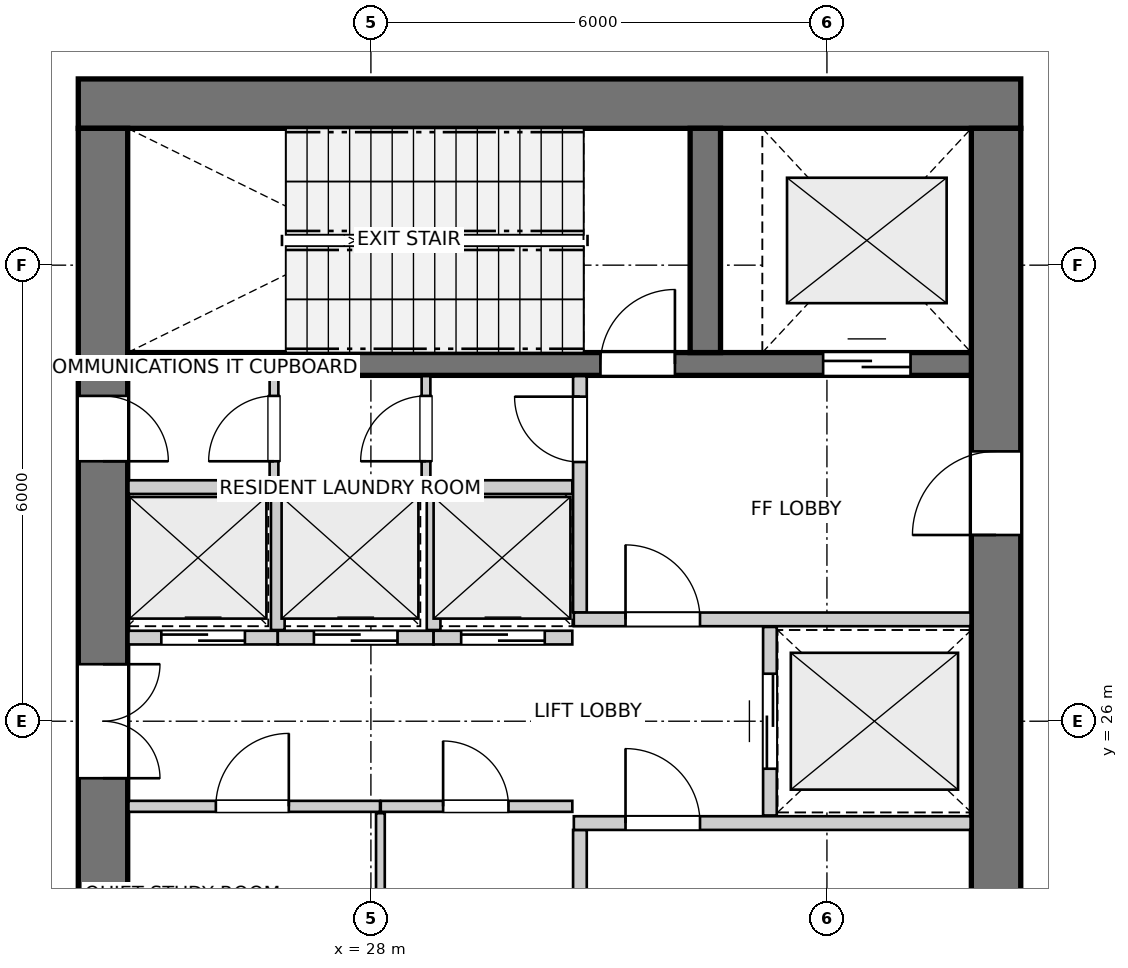
"""IFC4 building model, lengths in metres.
Left out: names, types, materials, properties, quantities, classifications, styles, units other than length and angle.
Written with IfcOpenShell. Run it as: python <this file> out.ifc"""

import sys

from ifc_helpers import new_model, si_unit, direction, frame, frame_2d, origin, place, context, subcontext, project, spatial, rectangle, extrude, source, transform, mapped, element, fill, save


model = new_model("IFC4")
c1 = context("Model", 3, precision=1e-05, world=origin(), true_north=direction((0.0, 1.0)))
c2 = subcontext(c1, "Body", "Model", "MODEL_VIEW")
j1 = project(units=[si_unit("LENGTHUNIT", "METRE"), si_unit("PLANEANGLEUNIT", "RADIAN")], contexts=[c1])
p1 = place(None, origin())
s1 = spatial("IfcSite", under=j1, at=p1, CompositionType="ELEMENT")
p2 = place(p1, origin())
s2 = spatial("IfcBuilding", under=s1, at=p2, CompositionType="ELEMENT")
p3 = place(p2, frame((0.0, 0.0, 190.6)))
s3 = spatial("IfcBuildingStorey", under=s2, at=p3, CompositionType="ELEMENT", Elevation=190.6)
p4 = place(p3, frame((36.55, 34.125, 0.0), z_axis=(0.0, 0.0, 1.0), x_axis=(-1.0, 0.0, 0.0)))
e1 = element("IfcWall", 1, at=p4, inside=s3, PredefinedType="SHEAR", context=c2, shape_type="SweptSolid", body=[
    extrude(rectangle(XDim=12.4, YDim=0.65, at=frame_2d((6.2, 0.0))), origin(), (0.0, 0.0, 1.0), 4.76),
])
p5 = place(p3, frame((24.475, 33.8, 0.0), z_axis=(0.0, 0.0, 1.0), x_axis=(0.0, -1.0, 0.0)))
e2 = element("IfcWall", 2, at=p5, inside=s3, PredefinedType="SHEAR", context=c2, shape_type="SweptSolid", body=[
    extrude(rectangle(XDim=15.6, YDim=0.65, at=frame_2d((7.8, 0.0))), origin(), (0.0, 0.0, 1.0), 4.76),
])
p6 = place(p5, frame((7.05, 0.0, 0.0)))
e3 = element("IfcOpeningElement", 3, at=p6, cuts=e2, PredefinedType="OPENING", context=c2, shape_type="SweptSolid", body=[
    extrude(rectangle(XDim=1.5, YDim=2.15, at=frame_2d((0.75, 1.075))), frame((0.0, 0.335, 0.0), z_axis=(0.0, -1.0, 0.0), x_axis=(1.0, 0.0, 0.0)), (0.0, 0.0, 1.0), 0.67),
])
p7 = place(p5, frame((3.52, 0.0, 0.0)))
e4 = element("IfcOpeningElement", 4, at=p7, cuts=e2, PredefinedType="OPENING", context=c2, shape_type="SweptSolid", body=[
    extrude(rectangle(XDim=0.86, YDim=2.05, at=frame_2d((0.43, 1.025))), frame((0.0, 0.335, 0.0), z_axis=(0.0, -1.0, 0.0), x_axis=(1.0, 0.0, 0.0)), (0.0, 0.0, 1.0), 0.67),
])
p8 = place(p5, frame((11.22, 0.0, 0.0)))
e5 = element("IfcOpeningElement", 5, at=p8, cuts=e2, PredefinedType="OPENING", context=c2, shape_type="SweptSolid", body=[
    extrude(rectangle(XDim=0.86, YDim=2.05, at=frame_2d((0.43, 1.025))), frame((0.0, 0.335, 0.0), z_axis=(0.0, -1.0, 0.0), x_axis=(1.0, 0.0, 0.0)), (0.0, 0.0, 1.0), 0.67),
])
p9 = place(p3, frame((36.225, 18.2, 0.0), z_axis=(0.0, 0.0, 1.0), x_axis=(0.0, 1.0, 0.0)))
e6 = element("IfcWall", 6, at=p9, inside=s3, PredefinedType="SHEAR", context=c2, shape_type="SweptSolid", body=[
    extrude(rectangle(XDim=15.6, YDim=0.65, at=frame_2d((7.8, 0.0))), origin(), (0.0, 0.0, 1.0), 4.76),
])
p10 = place(p9, frame((4.25, 0.0, 0.0)))
e7 = element("IfcOpeningElement", 7, at=p10, cuts=e6, PredefinedType="OPENING", context=c2, shape_type="SweptSolid", body=[
    extrude(rectangle(XDim=1.1, YDim=2.15, at=frame_2d((0.55, 1.075))), frame((0.0, 0.335, 0.0), z_axis=(0.0, -1.0, 0.0), x_axis=(1.0, 0.0, 0.0)), (0.0, 0.0, 1.0), 0.67),
])
p11 = place(p9, frame((10.25, 0.0, 0.0)))
e8 = element("IfcOpeningElement", 8, at=p11, cuts=e6, PredefinedType="OPENING", context=c2, shape_type="SweptSolid", body=[
    extrude(rectangle(XDim=1.1, YDim=2.15, at=frame_2d((0.55, 1.075))), frame((0.0, 0.335, 0.0), z_axis=(0.0, -1.0, 0.0), x_axis=(1.0, 0.0, 0.0)), (0.0, 0.0, 1.0), 0.67),
])
p12 = place(p3, frame((24.8, 30.7, 0.0), z_axis=(0.0, 0.0, 1.0), x_axis=(1.0, 0.0, 0.0)))
e9 = element("IfcWall", 9, at=p12, inside=s3, PredefinedType="SHEAR", context=c2, shape_type="SweptSolid", body=[
    extrude(rectangle(XDim=11.1, YDim=0.3, at=frame_2d((5.55, 0.0))), origin(), (0.0, 0.0, 1.0), 4.76),
])
p13 = place(p12, frame((6.22, 0.0, 0.0)))
e10 = element("IfcOpeningElement", 10, at=p13, cuts=e9, PredefinedType="OPENING", context=c2, shape_type="SweptSolid", body=[
    extrude(rectangle(XDim=0.98, YDim=2.15, at=frame_2d((0.49, 1.075))), frame((0.0, 0.16, 0.0), z_axis=(0.0, -1.0, 0.0), x_axis=(1.0, 0.0, 0.0)), (0.0, 0.0, 1.0), 0.32),
])
p14 = place(p12, frame((9.15, 0.0, 0.0)))
e11 = element("IfcOpeningElement", 11, at=p14, cuts=e9, PredefinedType="OPENING", context=c2, shape_type="SweptSolid", body=[
    extrude(rectangle(XDim=1.15, YDim=2.15, at=frame_2d((0.575, 1.075))), frame((0.0, 0.16, 0.0), z_axis=(0.0, -1.0, 0.0), x_axis=(1.0, 0.0, 0.0)), (0.0, 0.0, 1.0), 0.32),
])
p15 = place(p3, frame((32.4, 30.85, 0.0), z_axis=(0.0, 0.0, 1.0), x_axis=(0.0, 1.0, 0.0)))
e12 = element("IfcWall", 12, at=p15, inside=s3, PredefinedType="SHEAR", context=c2, shape_type="SweptSolid", body=[
    extrude(rectangle(XDim=2.95, YDim=0.4, at=frame_2d((1.475, 0.0))), origin(), (0.0, 0.0, 1.0), 4.76),
])
p16 = place(p3, frame((30.75, 21.46, 0.0), z_axis=(0.0, 0.0, 1.0), x_axis=(0.0, 1.0, 0.0)))
e13 = element("IfcWall", 13, at=p16, inside=s3, PredefinedType="PARTITIONING", context=c2, shape_type="SweptSolid", body=[
    extrude(rectangle(XDim=3.11, YDim=0.18, at=frame_2d((1.555, 0.0))), origin(), (0.0, 0.0, 1.0), 4.76),
])
p17 = place(p16, frame((0.26, 0.0, 0.0)))
e14 = element("IfcOpeningElement", 14, at=p17, cuts=e13, PredefinedType="OPENING", context=c2, shape_type="SweptSolid", body=[
    extrude(rectangle(XDim=0.86, YDim=2.05, at=frame_2d((0.43, 1.025))), frame((0.0, 0.1, 0.0), z_axis=(0.0, -1.0, 0.0), x_axis=(1.0, 0.0, 0.0)), (0.0, 0.0, 1.0), 0.2),
])
p18 = place(p3, frame((30.67, 24.66, 0.0), z_axis=(0.0, 0.0, 1.0), x_axis=(1.0, 0.0, 0.0)))
e15 = element("IfcWall", 15, at=p18, inside=s3, PredefinedType="PARTITIONING", context=c2, shape_type="SweptSolid", body=[
    extrude(rectangle(XDim=5.22, YDim=0.18, at=frame_2d((2.61, 0.0))), origin(), (0.0, 0.0, 1.0), 4.76),
])
p19 = place(p18, frame((0.68, 0.0, 0.0)))
e16 = element("IfcOpeningElement", 16, at=p19, cuts=e15, PredefinedType="OPENING", context=c2, shape_type="SweptSolid", body=[
    extrude(rectangle(XDim=0.98, YDim=2.15, at=frame_2d((0.49, 1.075))), frame((0.0, 0.1, 0.0), z_axis=(0.0, -1.0, 0.0), x_axis=(1.0, 0.0, 0.0)), (0.0, 0.0, 1.0), 0.2),
])
p20 = place(p3, frame((30.75, 27.43, 0.0), z_axis=(0.0, 0.0, 1.0), x_axis=(0.0, 1.0, 0.0)))
e17 = element("IfcWall", 17, at=p20, inside=s3, PredefinedType="PARTITIONING", context=c2, shape_type="SweptSolid", body=[
    extrude(rectangle(XDim=3.11, YDim=0.18, at=frame_2d((1.555, 0.0))), origin(), (0.0, 0.0, 1.0), 4.76),
])
p21 = place(p20, frame((1.98, 0.0, 0.0)))
e18 = element("IfcOpeningElement", 18, at=p21, cuts=e17, PredefinedType="OPENING", context=c2, shape_type="SweptSolid", body=[
    extrude(rectangle(XDim=0.86, YDim=2.05, at=frame_2d((0.43, 1.025))), frame((0.0, 0.1, 0.0), z_axis=(0.0, -1.0, 0.0), x_axis=(1.0, 0.0, 0.0)), (0.0, 0.0, 1.0), 0.2),
])
p22 = place(p3, frame((30.67, 27.34, 0.0), z_axis=(0.0, 0.0, 1.0), x_axis=(1.0, 0.0, 0.0)))
e19 = element("IfcWall", 19, at=p22, inside=s3, PredefinedType="PARTITIONING", context=c2, shape_type="SweptSolid", body=[
    extrude(rectangle(XDim=5.22, YDim=0.18, at=frame_2d((2.61, 0.0))), origin(), (0.0, 0.0, 1.0), 4.76),
])
p23 = place(p22, frame((0.68, 0.0, 0.0)))
e20 = element("IfcOpeningElement", 20, at=p23, cuts=e19, PredefinedType="OPENING", context=c2, shape_type="SweptSolid", body=[
    extrude(rectangle(XDim=0.98, YDim=2.15, at=frame_2d((0.49, 1.075))), frame((0.0, 0.1, 0.0), z_axis=(0.0, -1.0, 0.0), x_axis=(1.0, 0.0, 0.0)), (0.0, 0.0, 1.0), 0.2),
])
p24 = place(p3, frame((33.25, 24.76, 0.0), z_axis=(0.0, 0.0, 1.0), x_axis=(0.0, 1.0, 0.0)))
e21 = element("IfcWall", 21, at=p24, inside=s3, PredefinedType="PARTITIONING", context=c2, shape_type="SweptSolid", body=[
    extrude(rectangle(XDim=2.48, YDim=0.18, at=frame_2d((1.24, 0.0))), origin(), (0.0, 0.0, 1.0), 4.76),
])
p25 = place(p24, frame((0.615, 0.0, 0.0)))
e22 = element("IfcOpeningElement", 22, at=p25, cuts=e21, PredefinedType="OPENING", context=c2, shape_type="SweptSolid", body=[
    extrude(rectangle(XDim=1.25, YDim=2.15, at=frame_2d((0.625, 1.075))), frame((0.0, 0.1, 0.0), z_axis=(0.0, -1.0, 0.0), x_axis=(1.0, 0.0, 0.0)), (0.0, 0.0, 1.0), 0.2),
])
p26 = place(p3, frame((24.81, 24.88, 0.0), z_axis=(0.0, 0.0, 1.0), x_axis=(1.0, 0.0, 0.0)))
e23 = element("IfcWall", 23, at=p26, inside=s3, PredefinedType="PARTITIONING", context=c2, shape_type="SweptSolid", body=[
    extrude(rectangle(XDim=3.31, YDim=0.145, at=frame_2d((1.655, 0.0))), origin(), (0.0, 0.0, 1.0), 4.76),
])
p27 = place(p26, frame((1.15, 0.0, 0.0)))
e24 = element("IfcOpeningElement", 24, at=p27, cuts=e23, PredefinedType="OPENING", context=c2, shape_type="SweptSolid", body=[
    extrude(rectangle(XDim=0.96, YDim=2.1, at=frame_2d((0.48, 1.05))), frame((0.0, 0.083, 0.0), z_axis=(0.0, -1.0, 0.0), x_axis=(1.0, 0.0, 0.0)), (0.0, 0.0, 1.0), 0.165),
])
p28 = place(p3, frame((28.13, 24.88, 0.0), z_axis=(0.0, 0.0, 1.0), x_axis=(1.0, 0.0, 0.0)))
e25 = element("IfcWall", 25, at=p28, inside=s3, PredefinedType="PARTITIONING", context=c2, shape_type="SweptSolid", body=[
    extrude(rectangle(XDim=2.52, YDim=0.145, at=frame_2d((1.26, 0.0))), origin(), (0.0, 0.0, 1.0), 4.76),
])
p29 = place(p28, frame((0.82, 0.0, 0.0)))
e26 = element("IfcOpeningElement", 26, at=p29, cuts=e25, PredefinedType="OPENING", context=c2, shape_type="SweptSolid", body=[
    extrude(rectangle(XDim=0.86, YDim=2.05, at=frame_2d((0.43, 1.025))), frame((0.0, 0.083, 0.0), z_axis=(0.0, -1.0, 0.0), x_axis=(1.0, 0.0, 0.0)), (0.0, 0.0, 1.0), 0.165),
])
p30 = place(p3, frame((28.125, 23.02, 0.0), z_axis=(0.0, 0.0, 1.0), x_axis=(0.0, 1.0, 0.0)))
e27 = element("IfcWall", 27, at=p30, inside=s3, PredefinedType="PARTITIONING", context=c2, shape_type="SweptSolid", body=[
    extrude(rectangle(XDim=1.77, YDim=0.115, at=frame_2d((0.885, 0.0))), origin(), (0.0, 0.0, 1.0), 4.76),
])
p31 = place(p3, frame((24.81, 29.08, 0.0), z_axis=(0.0, 0.0, 1.0), x_axis=(1.0, 0.0, 0.0)))
e28 = element("IfcWall", 28, at=p31, inside=s3, PredefinedType="PARTITIONING", context=c2, shape_type="SweptSolid", body=[
    extrude(rectangle(XDim=5.84, YDim=0.18, at=frame_2d((2.92, 0.0))), origin(), (0.0, 0.0, 1.0), 4.76),
])
p32 = place(p3, frame((24.81, 27.1, 0.0), z_axis=(0.0, 0.0, 1.0), x_axis=(1.0, 0.0, 0.0)))
e29 = element("IfcWall", 29, at=p32, inside=s3, PredefinedType="PARTITIONING", context=c2, shape_type="SweptSolid", body=[
    extrude(rectangle(XDim=1.965, YDim=0.18, at=frame_2d((0.982, 0.0))), origin(), (0.0, 0.0, 1.0), 4.76),
])
p33 = place(p32, frame((0.433, 0.0, 0.0)))
e30 = element("IfcOpeningElement", 30, at=p33, cuts=e29, PredefinedType="OPENING", context=c2, shape_type="SweptSolid", body=[
    extrude(rectangle(XDim=1.1, YDim=2.15, at=frame_2d((0.55, 1.075))), frame((0.0, 0.1, 0.0), z_axis=(0.0, -1.0, 0.0), x_axis=(1.0, 0.0, 0.0)), (0.0, 0.0, 1.0), 0.2),
])
p34 = place(p3, frame((26.775, 27.1, 0.0), z_axis=(0.0, 0.0, 1.0), x_axis=(1.0, 0.0, 0.0)))
e31 = element("IfcWall", 31, at=p34, inside=s3, PredefinedType="PARTITIONING", context=c2, shape_type="SweptSolid", body=[
    extrude(rectangle(XDim=2.05, YDim=0.18, at=frame_2d((1.025, 0.0))), origin(), (0.0, 0.0, 1.0), 4.76),
])
p35 = place(p34, frame((0.475, 0.0, 0.0)))
e32 = element("IfcOpeningElement", 32, at=p35, cuts=e31, PredefinedType="OPENING", context=c2, shape_type="SweptSolid", body=[
    extrude(rectangle(XDim=1.1, YDim=2.15, at=frame_2d((0.55, 1.075))), frame((0.0, 0.1, 0.0), z_axis=(0.0, -1.0, 0.0), x_axis=(1.0, 0.0, 0.0)), (0.0, 0.0, 1.0), 0.2),
])
p36 = place(p3, frame((26.775, 27.2, 0.0), z_axis=(0.0, 0.0, 1.0), x_axis=(0.0, 1.0, 0.0)))
e33 = element("IfcWall", 33, at=p36, inside=s3, PredefinedType="PARTITIONING", context=c2, shape_type="SweptSolid", body=[
    extrude(rectangle(XDim=1.78, YDim=0.18, at=frame_2d((0.89, 0.0))), origin(), (0.0, 0.0, 1.0), 4.76),
])
p37 = place(p3, frame((28.825, 27.1, 0.0), z_axis=(0.0, 0.0, 1.0), x_axis=(1.0, 0.0, 0.0)))
e34 = element("IfcWall", 34, at=p37, inside=s3, PredefinedType="PARTITIONING", context=c2, shape_type="SweptSolid", body=[
    extrude(rectangle(XDim=1.825, YDim=0.18, at=frame_2d((0.913, 0.0))), origin(), (0.0, 0.0, 1.0), 4.76),
])
p38 = place(p37, frame((0.363, 0.0, 0.0)))
e35 = element("IfcOpeningElement", 35, at=p38, cuts=e34, PredefinedType="OPENING", context=c2, shape_type="SweptSolid", body=[
    extrude(rectangle(XDim=1.1, YDim=2.15, at=frame_2d((0.55, 1.075))), frame((0.0, 0.1, 0.0), z_axis=(0.0, -1.0, 0.0), x_axis=(1.0, 0.0, 0.0)), (0.0, 0.0, 1.0), 0.2),
])
p39 = place(p3, frame((28.825, 27.2, 0.0), z_axis=(0.0, 0.0, 1.0), x_axis=(0.0, 1.0, 0.0)))
e36 = element("IfcWall", 36, at=p39, inside=s3, PredefinedType="PARTITIONING", context=c2, shape_type="SweptSolid", body=[
    extrude(rectangle(XDim=1.78, YDim=0.18, at=frame_2d((0.89, 0.0))), origin(), (0.0, 0.0, 1.0), 4.76),
])
p40 = place(p3, frame((26.725, 29.16, 0.0), z_axis=(0.0, 0.0, 1.0), x_axis=(0.0, 1.0, 0.0)))
e37 = element("IfcWall", 37, at=p40, inside=s3, PredefinedType="PARTITIONING", context=c2, shape_type="SweptSolid", body=[
    extrude(rectangle(XDim=1.38, YDim=0.115, at=frame_2d((0.69, 0.0))), origin(), (0.0, 0.0, 1.0), 4.76),
])
p41 = place(p40, frame((0.26, 0.0, 0.0)))
e38 = element("IfcOpeningElement", 38, at=p41, cuts=e37, PredefinedType="OPENING", context=c2, shape_type="SweptSolid", body=[
    extrude(rectangle(XDim=0.86, YDim=2.05, at=frame_2d((0.43, 1.025))), frame((0.0, 0.067, 0.0), z_axis=(0.0, -1.0, 0.0), x_axis=(1.0, 0.0, 0.0)), (0.0, 0.0, 1.0), 0.135),
])
p42 = place(p3, frame((28.725, 29.16, 0.0), z_axis=(0.0, 0.0, 1.0), x_axis=(0.0, 1.0, 0.0)))
e39 = element("IfcWall", 39, at=p42, inside=s3, PredefinedType="PARTITIONING", context=c2, shape_type="SweptSolid", body=[
    extrude(rectangle(XDim=1.38, YDim=0.115, at=frame_2d((0.69, 0.0))), origin(), (0.0, 0.0, 1.0), 4.76),
])
p43 = place(p42, frame((0.26, 0.0, 0.0)))
e40 = element("IfcOpeningElement", 40, at=p43, cuts=e39, PredefinedType="OPENING", context=c2, shape_type="SweptSolid", body=[
    extrude(rectangle(XDim=0.86, YDim=2.05, at=frame_2d((0.43, 1.025))), frame((0.0, 0.067, 0.0), z_axis=(0.0, -1.0, 0.0), x_axis=(1.0, 0.0, 0.0)), (0.0, 0.0, 1.0), 0.135),
])
m1 = source(origin(), c2, "Body", "SweptSolid", [
    extrude(rectangle(XDim=0.98, YDim=2.15, at=frame_2d((0.49, 1.075))), frame((0.0, 0.025, 0.0), z_axis=(0.0, -1.0, 0.0), x_axis=(1.0, 0.0, 0.0)), (0.0, 0.0, 1.0), 0.05),
])
p44 = place(p13, origin())
e41 = element("IfcDoor", 41, at=p44, inside=s3, OperationType="SINGLE_SWING_RIGHT", PredefinedType="DOOR", context=c2, shape_type="MappedRepresentation", body=[
    mapped(m1, transform((0.0, 0.0, 0.0), x_axis=(1.0, 0.0, 0.0), y_axis=(0.0, 1.0, 0.0), z_axis=(0.0, 0.0, 1.0), scale=1.0)),
])
fill(e10, e41)
m2 = source(origin(), c2, "Body", "SweptSolid", [
    extrude(rectangle(XDim=1.15, YDim=2.15, at=frame_2d((0.575, 1.075))), frame((0.0, 0.025, 0.0), z_axis=(0.0, -1.0, 0.0), x_axis=(1.0, 0.0, 0.0)), (0.0, 0.0, 1.0), 0.05),
])
p45 = place(p14, origin())
e42 = element("IfcDoor", 42, at=p45, inside=s3, OperationType="DOUBLE_DOOR_SLIDING", PredefinedType="DOOR", context=c2, shape_type="MappedRepresentation", body=[
    mapped(m2, transform((0.0, 0.0, 0.0), x_axis=(1.0, 0.0, 0.0), y_axis=(0.0, 1.0, 0.0), z_axis=(0.0, 0.0, 1.0), scale=1.0)),
])
fill(e11, e42)
m3 = source(origin(), c2, "Body", "SweptSolid", [
    extrude(rectangle(XDim=1.1, YDim=2.15, at=frame_2d((0.55, 1.075))), frame((0.0, 0.025, 0.0), z_axis=(0.0, -1.0, 0.0), x_axis=(1.0, 0.0, 0.0)), (0.0, 0.0, 1.0), 0.05),
])
p46 = place(p11, origin())
e43 = element("IfcDoor", 43, at=p46, inside=s3, OperationType="SINGLE_SWING_LEFT", PredefinedType="DOOR", context=c2, shape_type="MappedRepresentation", body=[
    mapped(m3, transform((0.0, 0.0, 0.0), x_axis=(1.0, 0.0, 0.0), y_axis=(0.0, 1.0, 0.0), z_axis=(0.0, 0.0, 1.0), scale=1.0)),
])
fill(e8, e43)
m4 = source(origin(), c2, "Body", "SweptSolid", [
    extrude(rectangle(XDim=1.5, YDim=2.15, at=frame_2d((0.75, 1.075))), frame((0.0, 0.025, 0.0), z_axis=(0.0, -1.0, 0.0), x_axis=(1.0, 0.0, 0.0)), (0.0, 0.0, 1.0), 0.05),
])
p47 = place(p6, origin())
e44 = element("IfcDoor", 44, at=p47, inside=s3, OperationType="DOUBLE_DOOR_SINGLE_SWING", PredefinedType="DOOR", context=c2, shape_type="MappedRepresentation", body=[
    mapped(m4, transform((0.0, 0.0, 0.0), x_axis=(1.0, 0.0, 0.0), y_axis=(0.0, 1.0, 0.0), z_axis=(0.0, 0.0, 1.0), scale=1.0)),
])
fill(e3, e44)
m5 = source(origin(), c2, "Body", "SweptSolid", [
    extrude(rectangle(XDim=0.86, YDim=2.05, at=frame_2d((0.43, 1.025))), frame((0.0, 0.025, 0.0), z_axis=(0.0, -1.0, 0.0), x_axis=(1.0, 0.0, 0.0)), (0.0, 0.0, 1.0), 0.05),
])
p48 = place(p7, origin())
e45 = element("IfcDoor", 45, at=p48, inside=s3, OperationType="SINGLE_SWING_RIGHT", PredefinedType="DOOR", context=c2, shape_type="MappedRepresentation", body=[
    mapped(m5, transform((0.0, 0.0, 0.0), x_axis=(1.0, 0.0, 0.0), y_axis=(0.0, 1.0, 0.0), z_axis=(0.0, 0.0, 1.0), scale=1.0)),
])
fill(e4, e45)
p49 = place(p19, origin())
e46 = element("IfcDoor", 46, at=p49, inside=s3, OperationType="SINGLE_SWING_LEFT", PredefinedType="DOOR", context=c2, shape_type="MappedRepresentation", body=[
    mapped(m1, transform((0.0, 0.0, 0.0), x_axis=(1.0, 0.0, 0.0), y_axis=(0.0, 1.0, 0.0), z_axis=(0.0, 0.0, 1.0), scale=1.0)),
])
fill(e16, e46)
p50 = place(p21, origin())
e47 = element("IfcDoor", 47, at=p50, inside=s3, OperationType="SINGLE_SWING_RIGHT", PredefinedType="DOOR", context=c2, shape_type="MappedRepresentation", body=[
    mapped(m5, transform((0.0, 0.0, 0.0), x_axis=(1.0, 0.0, 0.0), y_axis=(0.0, 1.0, 0.0), z_axis=(0.0, 0.0, 1.0), scale=1.0)),
])
fill(e18, e47)
p51 = place(p23, origin())
e48 = element("IfcDoor", 48, at=p51, inside=s3, OperationType="SINGLE_SWING_LEFT", PredefinedType="DOOR", context=c2, shape_type="MappedRepresentation", body=[
    mapped(m1, transform((0.0, 0.0, 0.0), x_axis=(1.0, 0.0, 0.0), y_axis=(0.0, 1.0, 0.0), z_axis=(0.0, 0.0, 1.0), scale=1.0)),
])
fill(e20, e48)
m6 = source(origin(), c2, "Body", "SweptSolid", [
    extrude(rectangle(XDim=1.25, YDim=2.15, at=frame_2d((0.625, 1.075))), frame((0.0, 0.025, 0.0), z_axis=(0.0, -1.0, 0.0), x_axis=(1.0, 0.0, 0.0)), (0.0, 0.0, 1.0), 0.05),
])
p52 = place(p25, origin())
e49 = element("IfcDoor", 49, at=p52, inside=s3, OperationType="DOUBLE_DOOR_SLIDING", PredefinedType="DOOR", context=c2, shape_type="MappedRepresentation", body=[
    mapped(m6, transform((0.0, 0.0, 0.0), x_axis=(1.0, 0.0, 0.0), y_axis=(0.0, 1.0, 0.0), z_axis=(0.0, 0.0, 1.0), scale=1.0)),
])
fill(e22, e49)
m7 = source(origin(), c2, "Body", "SweptSolid", [
    extrude(rectangle(XDim=0.96, YDim=2.1, at=frame_2d((0.48, 1.05))), frame((0.0, 0.025, 0.0), z_axis=(0.0, -1.0, 0.0), x_axis=(1.0, 0.0, 0.0)), (0.0, 0.0, 1.0), 0.05),
])
p53 = place(p27, origin())
e50 = element("IfcDoor", 50, at=p53, inside=s3, OperationType="SINGLE_SWING_RIGHT", PredefinedType="DOOR", context=c2, shape_type="MappedRepresentation", body=[
    mapped(m7, transform((0.0, 0.0, 0.0), x_axis=(1.0, 0.0, 0.0), y_axis=(0.0, 1.0, 0.0), z_axis=(0.0, 0.0, 1.0), scale=1.0)),
])
fill(e24, e50)
p54 = place(p29, origin())
e51 = element("IfcDoor", 51, at=p54, inside=s3, OperationType="SINGLE_SWING_LEFT", PredefinedType="DOOR", context=c2, shape_type="MappedRepresentation", body=[
    mapped(m5, transform((0.0, 0.0, 0.0), x_axis=(1.0, 0.0, 0.0), y_axis=(0.0, 1.0, 0.0), z_axis=(0.0, 0.0, 1.0), scale=1.0)),
])
fill(e26, e51)
p55 = place(p33, origin())
e52 = element("IfcDoor", 52, at=p55, inside=s3, OperationType="DOUBLE_DOOR_SLIDING", PredefinedType="DOOR", context=c2, shape_type="MappedRepresentation", body=[
    mapped(m3, transform((0.0, 0.0, 0.0), x_axis=(1.0, 0.0, 0.0), y_axis=(0.0, 1.0, 0.0), z_axis=(0.0, 0.0, 1.0), scale=1.0)),
])
fill(e30, e52)
p56 = place(p35, origin())
e53 = element("IfcDoor", 53, at=p56, inside=s3, OperationType="DOUBLE_DOOR_SLIDING", PredefinedType="DOOR", context=c2, shape_type="MappedRepresentation", body=[
    mapped(m3, transform((0.0, 0.0, 0.0), x_axis=(1.0, 0.0, 0.0), y_axis=(0.0, 1.0, 0.0), z_axis=(0.0, 0.0, 1.0), scale=1.0)),
])
fill(e32, e53)
p57 = place(p38, origin())
e54 = element("IfcDoor", 54, at=p57, inside=s3, OperationType="DOUBLE_DOOR_SLIDING", PredefinedType="DOOR", context=c2, shape_type="MappedRepresentation", body=[
    mapped(m3, transform((0.0, 0.0, 0.0), x_axis=(1.0, 0.0, 0.0), y_axis=(0.0, 1.0, 0.0), z_axis=(0.0, 0.0, 1.0), scale=1.0)),
])
fill(e35, e54)
p58 = place(p41, origin())
e55 = element("IfcDoor", 55, at=p58, inside=s3, OperationType="SINGLE_SWING_LEFT", PredefinedType="DOOR", context=c2, shape_type="MappedRepresentation", body=[
    mapped(m5, transform((0.0, 0.0, 0.0), x_axis=(1.0, 0.0, 0.0), y_axis=(0.0, 1.0, 0.0), z_axis=(0.0, 0.0, 1.0), scale=1.0)),
])
fill(e38, e55)
p59 = place(p43, origin())
e56 = element("IfcDoor", 56, at=p59, inside=s3, OperationType="SINGLE_SWING_LEFT", PredefinedType="DOOR", context=c2, shape_type="MappedRepresentation", body=[
    mapped(m5, transform((0.0, 0.0, 0.0), x_axis=(1.0, 0.0, 0.0), y_axis=(0.0, 1.0, 0.0), z_axis=(0.0, 0.0, 1.0), scale=1.0)),
])
fill(e40, e56)
save(model, sys.argv[1])
